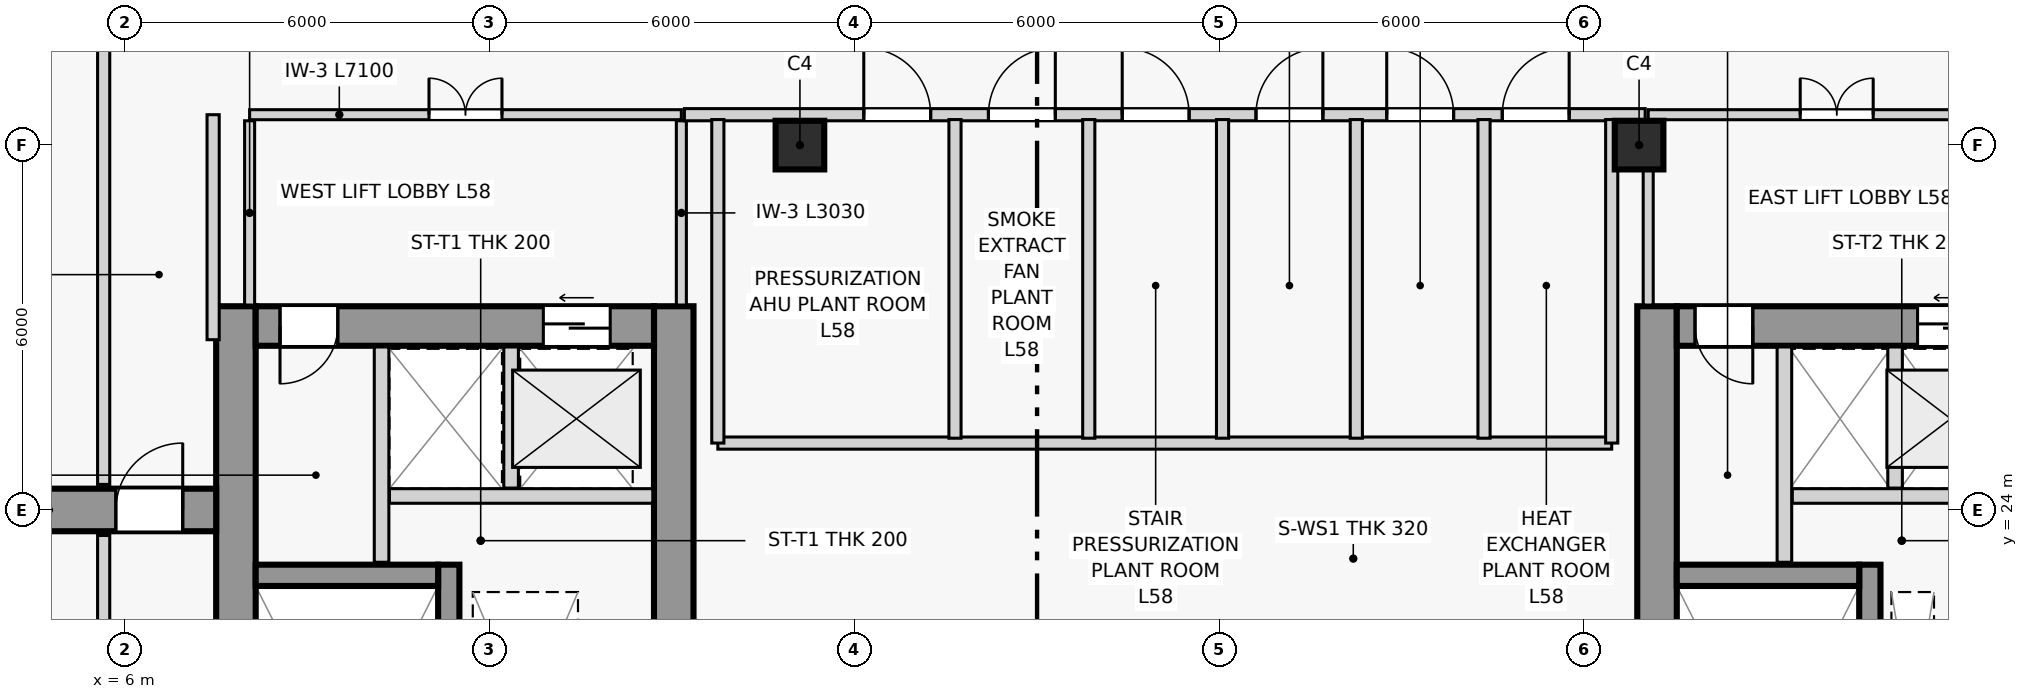
"""IFC4 building model, lengths in metres.
Left out: names, types, materials, properties, quantities, classifications, styles, units other than length and angle.
Written with IfcOpenShell. Run it as: python <this file> out.ifc"""

import sys

from ifc_helpers import new_model, si_unit, direction, frame, frame_2d, origin, origin_2d, place, context, subcontext, project, spatial, rectangle, extrude, source, transform, mapped, element, fill, save


model = new_model("IFC4")
c1 = context("Model", 3, precision=1e-05, world=origin(), true_north=direction((0.0, 1.0)))
c2 = subcontext(c1, "Body", "Model", "MODEL_VIEW")
j1 = project(units=[si_unit("LENGTHUNIT", "METRE"), si_unit("PLANEANGLEUNIT", "RADIAN")], contexts=[c1])
p1 = place(None, origin())
s1 = spatial("IfcSite", under=j1, at=p1, CompositionType="ELEMENT")
p2 = place(p1, origin())
s2 = spatial("IfcBuilding", under=s1, at=p2, CompositionType="ELEMENT")
p3 = place(p2, frame((0.0, 0.0, 220.5)))
s3 = spatial("IfcBuildingStorey", under=s2, at=p3, CompositionType="ELEMENT", Elevation=220.5)
p4 = place(p3, frame((7.825, 14.7, 0.0), z_axis=(0.0, 0.0, 1.0), x_axis=(0.0, 1.0, 0.0)))
e1 = element("IfcWall", 1, at=p4, inside=s3, PredefinedType="SHEAR", context=c2, shape_type="SweptSolid", body=[
    extrude(rectangle(XDim=12.65, YDim=0.65, at=frame_2d((6.325, 0.0))), origin(), (0.0, 0.0, 1.0), 7.2),
])
p5 = place(p3, frame((15.025, 14.7, 0.0), z_axis=(0.0, 0.0, 1.0), x_axis=(0.0, 1.0, 0.0)))
e2 = element("IfcWall", 2, at=p5, inside=s3, PredefinedType="SHEAR", context=c2, shape_type="SweptSolid", body=[
    extrude(rectangle(XDim=12.65, YDim=0.65, at=frame_2d((6.325, 0.0))), origin(), (0.0, 0.0, 1.0), 7.2),
])
p6 = place(p5, frame((5.4, 0.0, 0.0)))
e3 = element("IfcOpeningElement", 3, at=p6, cuts=e2, PredefinedType="OPENING", context=c2, shape_type="SweptSolid", body=[
    extrude(rectangle(XDim=1.1, YDim=2.2, at=frame_2d((0.55, 1.1))), frame((0.0, 0.335, 0.0), z_axis=(0.0, -1.0, 0.0), x_axis=(1.0, 0.0, 0.0)), (0.0, 0.0, 1.0), 0.67),
])
p7 = place(p3, frame((8.15, 27.025, 0.0), z_axis=(0.0, 0.0, 1.0), x_axis=(1.0, 0.0, 0.0)))
e4 = element("IfcWall", 4, at=p7, inside=s3, PredefinedType="SHEAR", context=c2, shape_type="SweptSolid", body=[
    extrude(rectangle(XDim=6.55, YDim=0.65, at=frame_2d((3.275, 0.0))), origin(), (0.0, 0.0, 1.0), 7.2),
])
p8 = place(p7, frame((0.4, 0.0, 0.0)))
e5 = element("IfcOpeningElement", 5, at=p8, cuts=e4, PredefinedType="OPENING", context=c2, shape_type="SweptSolid", body=[
    extrude(rectangle(XDim=0.95, YDim=2.1, at=frame_2d((0.475, 1.05))), frame((0.0, 0.335, 0.0), z_axis=(0.0, -1.0, 0.0), x_axis=(1.0, 0.0, 0.0)), (0.0, 0.0, 1.0), 0.67),
])
p9 = place(p7, frame((4.73, 0.0, 0.0)))
e6 = element("IfcOpeningElement", 6, at=p9, cuts=e4, PredefinedType="OPENING", context=c2, shape_type="SweptSolid", body=[
    extrude(rectangle(XDim=1.1, YDim=2.2, at=frame_2d((0.55, 1.1))), frame((0.0, 0.335, 0.0), z_axis=(0.0, -1.0, 0.0), x_axis=(1.0, 0.0, 0.0)), (0.0, 0.0, 1.0), 0.67),
])
p10 = place(p3, frame((31.195, 14.7, 0.0), z_axis=(0.0, 0.0, 1.0), x_axis=(0.0, 1.0, 0.0)))
e7 = element("IfcWall", 7, at=p10, inside=s3, PredefinedType="SHEAR", context=c2, shape_type="SweptSolid", body=[
    extrude(rectangle(XDim=12.65, YDim=0.65, at=frame_2d((6.325, 0.0))), origin(), (0.0, 0.0, 1.0), 7.2),
])
p11 = place(p3, frame((31.52, 27.025, 0.0), z_axis=(0.0, 0.0, 1.0), x_axis=(1.0, 0.0, 0.0)))
e8 = element("IfcWall", 8, at=p11, inside=s3, PredefinedType="SHEAR", context=c2, shape_type="SweptSolid", body=[
    extrude(rectangle(XDim=5.38, YDim=0.65, at=frame_2d((2.69, 0.0))), origin(), (0.0, 0.0, 1.0), 7.2),
])
p12 = place(p11, frame((0.3, 0.0, 0.0)))
e9 = element("IfcOpeningElement", 9, at=p12, cuts=e8, PredefinedType="OPENING", context=c2, shape_type="SweptSolid", body=[
    extrude(rectangle(XDim=0.95, YDim=2.1, at=frame_2d((0.475, 1.05))), frame((0.0, 0.335, 0.0), z_axis=(0.0, -1.0, 0.0), x_axis=(1.0, 0.0, 0.0)), (0.0, 0.0, 1.0), 0.67),
])
p13 = place(p11, frame((3.96, 0.0, 0.0)))
e10 = element("IfcOpeningElement", 10, at=p13, cuts=e8, PredefinedType="OPENING", context=c2, shape_type="SweptSolid", body=[
    extrude(rectangle(XDim=1.1, YDim=2.2, at=frame_2d((0.55, 1.1))), frame((0.0, 0.335, 0.0), z_axis=(0.0, -1.0, 0.0), x_axis=(1.0, 0.0, 0.0)), (0.0, 0.0, 1.0), 0.67),
])
p14 = place(p3, frame((11.325, 15.35, 0.0), z_axis=(0.0, 0.0, 1.0), x_axis=(0.0, 1.0, 0.0)))
e11 = element("IfcWall", 11, at=p14, inside=s3, PredefinedType="SHEAR", context=c2, shape_type="SweptSolid", body=[
    extrude(rectangle(XDim=7.75, YDim=0.35, at=frame_2d((3.875, 0.0))), origin(), (0.0, 0.0, 1.0), 7.2),
])
p15 = place(p3, frame((8.15, 22.925, 0.0), z_axis=(0.0, 0.0, 1.0), x_axis=(1.0, 0.0, 0.0)))
e12 = element("IfcWall", 12, at=p15, inside=s3, PredefinedType="SHEAR", context=c2, shape_type="SweptSolid", body=[
    extrude(rectangle(XDim=3.0, YDim=0.35, at=frame_2d((1.5, 0.0))), origin(), (0.0, 0.0, 1.0), 7.2),
])
p16 = place(p3, frame((34.695, 15.35, 0.0), z_axis=(0.0, 0.0, 1.0), x_axis=(0.0, 1.0, 0.0)))
e13 = element("IfcWall", 13, at=p16, inside=s3, PredefinedType="SHEAR", context=c2, shape_type="SweptSolid", body=[
    extrude(rectangle(XDim=7.75, YDim=0.35, at=frame_2d((3.875, 0.0))), origin(), (0.0, 0.0, 1.0), 7.2),
])
p17 = place(p3, frame((31.52, 22.925, 0.0), z_axis=(0.0, 0.0, 1.0), x_axis=(1.0, 0.0, 0.0)))
e14 = element("IfcWall", 14, at=p17, inside=s3, PredefinedType="SHEAR", context=c2, shape_type="SweptSolid", body=[
    extrude(rectangle(XDim=3.0, YDim=0.35, at=frame_2d((1.5, 0.0))), origin(), (0.0, 0.0, 1.0), 7.2),
])
m1 = source(origin(), c2, "Body", "SweptSolid", [
    extrude(rectangle(XDim=0.8, YDim=0.8, at=origin_2d()), origin(), (0.0, 0.0, 1.0), 7.2),
])
for number, where, z_axis, x_axis in (
    (15, (17.1, 30.0, 0.0), (0.0, 0.0, 1.0), (1.0, 0.0, 0.0)),
    (16, (30.9, 30.0, 0.0), (0.0, 0.0, 1.0), (1.0, 0.0, 0.0)),
):
    element("IfcColumn", number, at=place(p3, frame(where, z_axis=z_axis, x_axis=x_axis)), inside=s3, PredefinedType="COLUMN", context=c2, shape_type="MappedRepresentation", body=[
        mapped(m1, transform((0.0, 0.0, 0.0), scale=1.0)),
    ])
p18 = place(p3, frame((3.65, 24.0, 0.0), z_axis=(0.0, 0.0, 1.0), x_axis=(1.0, 0.0, 0.0)))
e17 = element("IfcWall", 17, at=p18, inside=s3, PredefinedType="SOLIDWALL", context=c2, shape_type="SweptSolid", body=[
    extrude(rectangle(XDim=3.85, YDim=0.7, at=frame_2d((1.925, 0.0))), origin(), (0.0, 0.0, 1.0), 6.55),
])
p19 = place(p18, frame((2.2, 0.0, 0.0)))
e18 = element("IfcOpeningElement", 18, at=p19, cuts=e17, PredefinedType="OPENING", context=c2, shape_type="SweptSolid", body=[
    extrude(rectangle(XDim=1.1, YDim=2.2, at=frame_2d((0.55, 1.1))), frame((0.0, 0.36, 0.0), z_axis=(0.0, -1.0, 0.0), x_axis=(1.0, 0.0, 0.0)), (0.0, 0.0, 1.0), 0.72),
])
p20 = place(p3, frame((10.22, 23.14, 0.0), z_axis=(0.0, 0.0, 1.0), x_axis=(0.0, 1.0, 0.0)))
e19 = element("IfcWall", 19, at=p20, inside=s3, PredefinedType="PARTITIONING", context=c2, shape_type="SweptSolid", body=[
    extrude(rectangle(XDim=3.54, YDim=0.24, at=frame_2d((1.77, 0.0))), origin(), (0.0, 0.0, 1.0), 6.55),
])
p21 = place(p3, frame((10.35, 24.23, 0.0), z_axis=(0.0, 0.0, 1.0), x_axis=(1.0, 0.0, 0.0)))
e20 = element("IfcWall", 20, at=p21, inside=s3, PredefinedType="PARTITIONING", context=c2, shape_type="SweptSolid", body=[
    extrude(rectangle(XDim=4.33, YDim=0.24, at=frame_2d((2.165, 0.0))), origin(), (0.0, 0.0, 1.0), 6.55),
])
p22 = place(p3, frame((12.35, 24.36, 0.0), z_axis=(0.0, 0.0, 1.0), x_axis=(0.0, 1.0, 0.0)))
e21 = element("IfcWall", 21, at=p22, inside=s3, PredefinedType="PARTITIONING", context=c2, shape_type="SweptSolid", body=[
    extrude(rectangle(XDim=2.32, YDim=0.24, at=frame_2d((1.16, 0.0))), origin(), (0.0, 0.0, 1.0), 6.55),
])
p23 = place(p3, frame((33.29, 23.14, 0.0), z_axis=(0.0, 0.0, 1.0), x_axis=(0.0, 1.0, 0.0)))
e22 = element("IfcWall", 22, at=p23, inside=s3, PredefinedType="PARTITIONING", context=c2, shape_type="SweptSolid", body=[
    extrude(rectangle(XDim=3.54, YDim=0.24, at=frame_2d((1.77, 0.0))), origin(), (0.0, 0.0, 1.0), 6.55),
])
p24 = place(p3, frame((33.42, 24.23, 0.0), z_axis=(0.0, 0.0, 1.0), x_axis=(1.0, 0.0, 0.0)))
e23 = element("IfcWall", 23, at=p24, inside=s3, PredefinedType="PARTITIONING", context=c2, shape_type="SweptSolid", body=[
    extrude(rectangle(XDim=3.46, YDim=0.24, at=frame_2d((1.73, 0.0))), origin(), (0.0, 0.0, 1.0), 6.55),
])
p25 = place(p3, frame((35.11, 24.36, 0.0), z_axis=(0.0, 0.0, 1.0), x_axis=(0.0, 1.0, 0.0)))
e24 = element("IfcWall", 24, at=p25, inside=s3, PredefinedType="PARTITIONING", context=c2, shape_type="SweptSolid", body=[
    extrude(rectangle(XDim=2.32, YDim=0.24, at=frame_2d((1.16, 0.0))), origin(), (0.0, 0.0, 1.0), 6.55),
])
p26 = place(p3, frame((8.05, 30.5, 0.0), z_axis=(0.0, 0.0, 1.0), x_axis=(1.0, 0.0, 0.0)))
e25 = element("IfcWall", 25, at=p26, inside=s3, PredefinedType="PARTITIONING", context=c2, shape_type="SweptSolid", body=[
    extrude(rectangle(XDim=7.1, YDim=0.165, at=frame_2d((3.55, 0.0))), origin(), (0.0, 0.0, 1.0), 4.95),
])
p27 = place(p26, frame((2.95, 0.0, 0.0)))
e26 = element("IfcOpeningElement", 26, at=p27, cuts=e25, PredefinedType="OPENING", context=c2, shape_type="SweptSolid", body=[
    extrude(rectangle(XDim=1.2, YDim=2.2, at=frame_2d((0.6, 1.1))), frame((0.0, 0.093, 0.0), z_axis=(0.0, -1.0, 0.0), x_axis=(1.0, 0.0, 0.0)), (0.0, 0.0, 1.0), 0.185),
])
for number, where, z_axis, x_axis in (
    (27, (8.05, 27.37, 0.0), (0.0, 0.0, 1.0), (0.0, 1.0, 0.0)),
    (28, (15.15, 27.37, 0.0), (0.0, 0.0, 1.0), (0.0, 1.0, 0.0)),
):
    element("IfcWall", number, at=place(p3, frame(where, z_axis=z_axis, x_axis=x_axis)), inside=s3, PredefinedType="PARTITIONING", context=c2, shape_type="SweptSolid", body=[
        extrude(rectangle(XDim=3.03, YDim=0.165, at=frame_2d((1.515, 0.0))), origin(), (0.0, 0.0, 1.0), 6.55),
    ])
p28 = place(p3, frame((31.05, 30.5, 0.0), z_axis=(0.0, 0.0, 1.0), x_axis=(1.0, 0.0, 0.0)))
e29 = element("IfcWall", 29, at=p28, inside=s3, PredefinedType="PARTITIONING", context=c2, shape_type="SweptSolid", body=[
    extrude(rectangle(XDim=6.2, YDim=0.165, at=frame_2d((3.1, 0.0))), origin(), (0.0, 0.0, 1.0), 4.95),
])
p29 = place(p28, frame((2.5, 0.0, 0.0)))
e30 = element("IfcOpeningElement", 30, at=p29, cuts=e29, PredefinedType="OPENING", context=c2, shape_type="SweptSolid", body=[
    extrude(rectangle(XDim=1.2, YDim=2.2, at=frame_2d((0.6, 1.1))), frame((0.0, 0.093, 0.0), z_axis=(0.0, -1.0, 0.0), x_axis=(1.0, 0.0, 0.0)), (0.0, 0.0, 1.0), 0.185),
])
p30 = place(p3, frame((31.05, 27.37, 0.0), z_axis=(0.0, 0.0, 1.0), x_axis=(0.0, 1.0, 0.0)))
e31 = element("IfcWall", 31, at=p30, inside=s3, PredefinedType="PARTITIONING", context=c2, shape_type="SweptSolid", body=[
    extrude(rectangle(XDim=3.03, YDim=0.165, at=frame_2d((1.515, 0.0))), origin(), (0.0, 0.0, 1.0), 4.95),
])
p31 = place(p3, frame((15.2, 30.5, 0.0), z_axis=(0.0, 0.0, 1.0), x_axis=(1.0, 0.0, 0.0)))
e32 = element("IfcWall", 32, at=p31, inside=s3, PredefinedType="PARTITIONING", context=c2, shape_type="SweptSolid", body=[
    extrude(rectangle(XDim=15.8, YDim=0.2, at=frame_2d((7.9, 0.0))), origin(), (0.0, 0.0, 1.0), 4.95),
])
p32 = place(p31, frame((2.95, 0.0, 0.0)))
e33 = element("IfcOpeningElement", 33, at=p32, cuts=e32, PredefinedType="OPENING", context=c2, shape_type="SweptSolid", body=[
    extrude(rectangle(XDim=1.1, YDim=2.2, at=frame_2d((0.55, 1.1))), frame((0.0, 0.11, 0.0), z_axis=(0.0, -1.0, 0.0), x_axis=(1.0, 0.0, 0.0)), (0.0, 0.0, 1.0), 0.22),
])
p33 = place(p31, frame((5.0, 0.0, 0.0)))
e34 = element("IfcOpeningElement", 34, at=p33, cuts=e32, PredefinedType="OPENING", context=c2, shape_type="SweptSolid", body=[
    extrude(rectangle(XDim=1.1, YDim=2.2, at=frame_2d((0.55, 1.1))), frame((0.0, 0.11, 0.0), z_axis=(0.0, -1.0, 0.0), x_axis=(1.0, 0.0, 0.0)), (0.0, 0.0, 1.0), 0.22),
])
p34 = place(p31, frame((7.2, 0.0, 0.0)))
e35 = element("IfcOpeningElement", 35, at=p34, cuts=e32, PredefinedType="OPENING", context=c2, shape_type="SweptSolid", body=[
    extrude(rectangle(XDim=1.1, YDim=2.2, at=frame_2d((0.55, 1.1))), frame((0.0, 0.11, 0.0), z_axis=(0.0, -1.0, 0.0), x_axis=(1.0, 0.0, 0.0)), (0.0, 0.0, 1.0), 0.22),
])
p35 = place(p31, frame((9.4, 0.0, 0.0)))
e36 = element("IfcOpeningElement", 36, at=p35, cuts=e32, PredefinedType="OPENING", context=c2, shape_type="SweptSolid", body=[
    extrude(rectangle(XDim=1.1, YDim=2.2, at=frame_2d((0.55, 1.1))), frame((0.0, 0.11, 0.0), z_axis=(0.0, -1.0, 0.0), x_axis=(1.0, 0.0, 0.0)), (0.0, 0.0, 1.0), 0.22),
])
p36 = place(p31, frame((11.55, 0.0, 0.0)))
e37 = element("IfcOpeningElement", 37, at=p36, cuts=e32, PredefinedType="OPENING", context=c2, shape_type="SweptSolid", body=[
    extrude(rectangle(XDim=1.1, YDim=2.2, at=frame_2d((0.55, 1.1))), frame((0.0, 0.11, 0.0), z_axis=(0.0, -1.0, 0.0), x_axis=(1.0, 0.0, 0.0)), (0.0, 0.0, 1.0), 0.22),
])
p37 = place(p31, frame((13.45, 0.0, 0.0)))
e38 = element("IfcOpeningElement", 38, at=p37, cuts=e32, PredefinedType="OPENING", context=c2, shape_type="SweptSolid", body=[
    extrude(rectangle(XDim=1.1, YDim=2.2, at=frame_2d((0.55, 1.1))), frame((0.0, 0.11, 0.0), z_axis=(0.0, -1.0, 0.0), x_axis=(1.0, 0.0, 0.0)), (0.0, 0.0, 1.0), 0.22),
])
p38 = place(p3, frame((15.75, 25.1, 0.0), z_axis=(0.0, 0.0, 1.0), x_axis=(1.0, 0.0, 0.0)))
e39 = element("IfcWall", 39, at=p38, inside=s3, PredefinedType="PARTITIONING", context=c2, shape_type="SweptSolid", body=[
    extrude(rectangle(XDim=14.7, YDim=0.2, at=frame_2d((7.35, 0.0))), origin(), (0.0, 0.0, 1.0), 6.55),
])
p39 = place(p3, frame((15.75, 25.1, 0.0), z_axis=(0.0, 0.0, 1.0), x_axis=(0.0, 1.0, 0.0)))
e40 = element("IfcWall", 40, at=p39, inside=s3, PredefinedType="PARTITIONING", context=c2, shape_type="SweptSolid", body=[
    extrude(rectangle(XDim=5.32, YDim=0.2, at=frame_2d((2.66, 0.0))), origin(), (0.0, 0.0, 1.0), 6.55),
])
p40 = place(p3, frame((30.45, 25.1, 0.0), z_axis=(0.0, 0.0, 1.0), x_axis=(0.0, 1.0, 0.0)))
e41 = element("IfcWall", 41, at=p40, inside=s3, PredefinedType="PARTITIONING", context=c2, shape_type="SweptSolid", body=[
    extrude(rectangle(XDim=5.32, YDim=0.2, at=frame_2d((2.66, 0.0))), origin(), (0.0, 0.0, 1.0), 4.95),
])
for number, where, z_axis, x_axis in (
    (42, (19.65, 25.18, 0.0), (0.0, 0.0, 1.0), (0.0, 1.0, 0.0)),
    (43, (21.85, 25.18, 0.0), (0.0, 0.0, 1.0), (0.0, 1.0, 0.0)),
    (44, (24.05, 25.18, 0.0), (0.0, 0.0, 1.0), (0.0, 1.0, 0.0)),
    (45, (26.25, 25.18, 0.0), (0.0, 0.0, 1.0), (0.0, 1.0, 0.0)),
    (46, (28.35, 25.18, 0.0), (0.0, 0.0, 1.0), (0.0, 1.0, 0.0)),
):
    element("IfcWall", number, at=place(p3, frame(where, z_axis=z_axis, x_axis=x_axis)), inside=s3, PredefinedType="PARTITIONING", context=c2, shape_type="SweptSolid", body=[
        extrude(rectangle(XDim=5.24, YDim=0.2, at=frame_2d((2.62, 0.0))), origin(), (0.0, 0.0, 1.0), 6.55),
    ])
p41 = place(p3, frame((5.65, 18.42, 0.0), z_axis=(0.0, 0.0, 1.0), x_axis=(0.0, 1.0, 0.0)))
e47 = element("IfcWall", 47, at=p41, inside=s3, PredefinedType="PARTITIONING", context=c2, shape_type="SweptSolid", body=[
    extrude(rectangle(XDim=5.16, YDim=0.2, at=frame_2d((2.58, 0.0))), origin(), (0.0, 0.0, 1.0), 6.55),
])
p42 = place(p3, frame((5.65, 24.42, 0.0), z_axis=(0.0, 0.0, 1.0), x_axis=(0.0, 1.0, 0.0)))
e48 = element("IfcWall", 48, at=p42, inside=s3, PredefinedType="PARTITIONING", context=c2, shape_type="SweptSolid", body=[
    extrude(rectangle(XDim=8.08, YDim=0.2, at=frame_2d((4.04, 0.0))), origin(), (0.0, 0.0, 1.0), 6.55),
])
p43 = place(p3, frame((7.45, 26.8, 0.0), z_axis=(0.0, 0.0, 1.0), x_axis=(0.0, 1.0, 0.0)))
e49 = element("IfcWall", 49, at=p43, inside=s3, PredefinedType="PARTITIONING", context=c2, shape_type="SweptSolid", body=[
    extrude(rectangle(XDim=3.7, YDim=0.2, at=frame_2d((1.85, 0.0))), origin(), (0.0, 0.0, 1.0), 6.55),
])
m2 = source(origin(), c2, "Body", "SweptSolid", [
    extrude(rectangle(XDim=0.95, YDim=2.1, at=frame_2d((0.475, 1.05))), frame((0.0, 0.025, 0.0), z_axis=(0.0, -1.0, 0.0), x_axis=(1.0, 0.0, 0.0)), (0.0, 0.0, 1.0), 0.05),
])
p44 = place(p8, frame((0.95, 0.0, 0.0), z_axis=(0.0, 0.0, 1.0), x_axis=(-1.0, 0.0, 0.0)))
e50 = element("IfcDoor", 50, at=p44, inside=s3, OperationType="SINGLE_SWING_RIGHT", PredefinedType="DOOR", context=c2, shape_type="MappedRepresentation", body=[
    mapped(m2, transform((0.0, 0.0, 0.0), scale=1.0)),
])
fill(e5, e50)
p45 = place(p12, frame((0.95, 0.0, 0.0), z_axis=(0.0, 0.0, 1.0), x_axis=(-1.0, 0.0, 0.0)))
e51 = element("IfcDoor", 51, at=p45, inside=s3, OperationType="SINGLE_SWING_LEFT", PredefinedType="DOOR", context=c2, shape_type="MappedRepresentation", body=[
    mapped(m2, transform((0.0, 0.0, 0.0), scale=1.0)),
])
fill(e9, e51)
m3 = source(origin(), c2, "Body", "SweptSolid", [
    extrude(rectangle(XDim=1.1, YDim=2.2, at=frame_2d((0.55, 1.1))), frame((0.0, 0.025, 0.0), z_axis=(0.0, -1.0, 0.0), x_axis=(1.0, 0.0, 0.0)), (0.0, 0.0, 1.0), 0.05),
])
p46 = place(p9, origin())
e52 = element("IfcDoor", 52, at=p46, inside=s3, OperationType="SLIDING_TO_LEFT", PredefinedType="DOOR", context=c2, shape_type="MappedRepresentation", body=[
    mapped(m3, transform((0.0, 0.0, 0.0), scale=1.0)),
])
fill(e6, e52)
p47 = place(p13, origin())
e53 = element("IfcDoor", 53, at=p47, inside=s3, OperationType="SLIDING_TO_LEFT", PredefinedType="DOOR", context=c2, shape_type="MappedRepresentation", body=[
    mapped(m3, transform((0.0, 0.0, 0.0), scale=1.0)),
])
fill(e10, e53)
m4 = source(origin(), c2, "Body", "SweptSolid", [
    extrude(rectangle(XDim=1.2, YDim=2.2, at=frame_2d((0.6, 1.1))), frame((0.0, 0.025, 0.0), z_axis=(0.0, -1.0, 0.0), x_axis=(1.0, 0.0, 0.0)), (0.0, 0.0, 1.0), 0.05),
])
p48 = place(p27, origin())
e54 = element("IfcDoor", 54, at=p48, inside=s3, OperationType="DOUBLE_DOOR_SINGLE_SWING", PredefinedType="DOOR", context=c2, shape_type="MappedRepresentation", body=[
    mapped(m4, transform((0.0, 0.0, 0.0), scale=1.0)),
])
fill(e26, e54)
p49 = place(p29, origin())
e55 = element("IfcDoor", 55, at=p49, inside=s3, OperationType="DOUBLE_DOOR_SINGLE_SWING", PredefinedType="DOOR", context=c2, shape_type="MappedRepresentation", body=[
    mapped(m4, transform((0.0, 0.0, 0.0), scale=1.0)),
])
fill(e30, e55)
m5 = source(origin(), c2, "Body", "SweptSolid", [
    extrude(rectangle(XDim=1.1, YDim=2.2, at=frame_2d((0.55, 1.1))), frame((0.0, 0.025, 0.0), z_axis=(0.0, -1.0, 0.0), x_axis=(1.0, 0.0, 0.0)), (0.0, 0.0, 1.0), 0.05),
])
p50 = place(p32, origin())
e56 = element("IfcDoor", 56, at=p50, inside=s3, OperationType="SINGLE_SWING_LEFT", PredefinedType="DOOR", context=c2, shape_type="MappedRepresentation", body=[
    mapped(m5, transform((0.0, 0.0, 0.0), scale=1.0)),
])
fill(e33, e56)
p51 = place(p33, origin())
e57 = element("IfcDoor", 57, at=p51, inside=s3, OperationType="SINGLE_SWING_RIGHT", PredefinedType="DOOR", context=c2, shape_type="MappedRepresentation", body=[
    mapped(m5, transform((0.0, 0.0, 0.0), scale=1.0)),
])
fill(e34, e57)
p52 = place(p34, origin())
e58 = element("IfcDoor", 58, at=p52, inside=s3, OperationType="SINGLE_SWING_LEFT", PredefinedType="DOOR", context=c2, shape_type="MappedRepresentation", body=[
    mapped(m5, transform((0.0, 0.0, 0.0), scale=1.0)),
])
fill(e35, e58)
p53 = place(p35, origin())
e59 = element("IfcDoor", 59, at=p53, inside=s3, OperationType="SINGLE_SWING_RIGHT", PredefinedType="DOOR", context=c2, shape_type="MappedRepresentation", body=[
    mapped(m5, transform((0.0, 0.0, 0.0), scale=1.0)),
])
fill(e36, e59)
p54 = place(p36, origin())
e60 = element("IfcDoor", 60, at=p54, inside=s3, OperationType="SINGLE_SWING_LEFT", PredefinedType="DOOR", context=c2, shape_type="MappedRepresentation", body=[
    mapped(m5, transform((0.0, 0.0, 0.0), scale=1.0)),
])
fill(e37, e60)
p55 = place(p37, origin())
e61 = element("IfcDoor", 61, at=p55, inside=s3, OperationType="SINGLE_SWING_RIGHT", PredefinedType="DOOR", context=c2, shape_type="MappedRepresentation", body=[
    mapped(m5, transform((0.0, 0.0, 0.0), scale=1.0)),
])
fill(e38, e61)
p56 = place(p19, origin())
e62 = element("IfcDoor", 62, at=p56, inside=s3, OperationType="SINGLE_SWING_RIGHT", PredefinedType="DOOR", context=c2, shape_type="MappedRepresentation", body=[
    mapped(m5, transform((0.0, 0.0, 0.0), scale=1.0)),
])
fill(e18, e62)
save(model, sys.argv[1])
